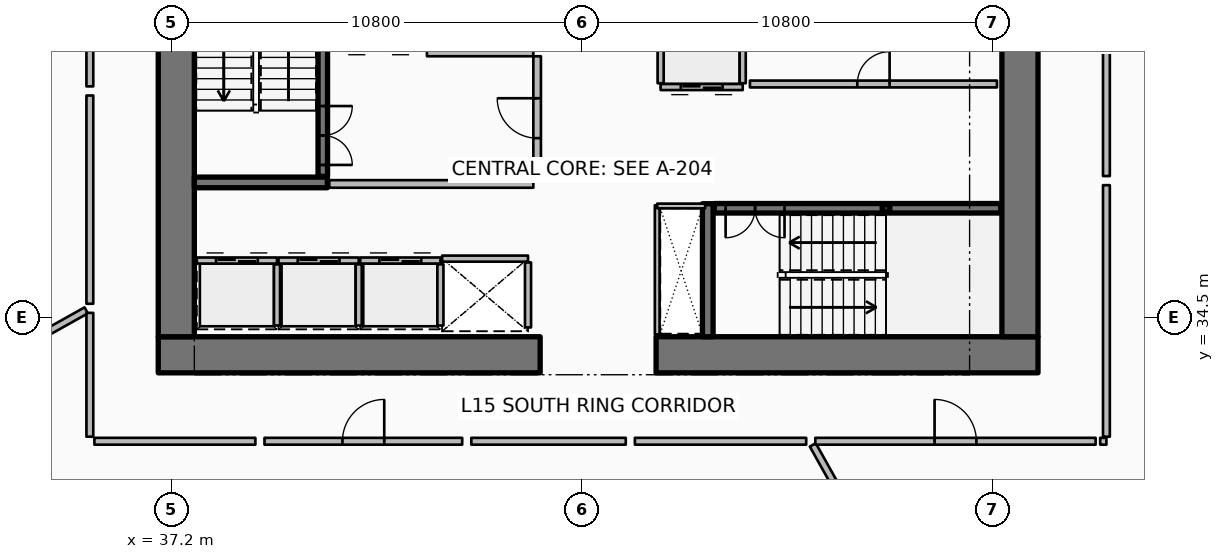
"""IFC4 building model, lengths in metres.
Left out: names, types, materials, properties, quantities, classifications, styles, units other than length and angle.
Written with IfcOpenShell. Run it as: python <this file> out.ifc"""

import sys

from ifc_helpers import new_model, si_unit, direction, frame, frame_2d, origin, origin_2d, place, context, subcontext, project, spatial, rectangle, hollow_rectangle, extrude, element, fill, save


model = new_model("IFC4")
c1 = context("Model", 3, precision=1e-05, world=origin(), true_north=direction((0.0, 1.0)))
c2 = subcontext(c1, "Body", "Model", "MODEL_VIEW")
j1 = project(units=[si_unit("LENGTHUNIT", "METRE"), si_unit("PLANEANGLEUNIT", "RADIAN")], contexts=[c1])
p1 = place(None, origin())
s1 = spatial("IfcSite", under=j1, at=p1, CompositionType="ELEMENT")
p2 = place(p1, origin())
s2 = spatial("IfcBuilding", under=s1, at=p2, CompositionType="ELEMENT")
p3 = place(p2, frame((0.0, 0.0, 63.9)))
s3 = spatial("IfcBuildingStorey", under=s2, at=p3, CompositionType="ELEMENT", Elevation=63.9)
p4 = place(p3, frame((36.85, 33.525, 0.0), z_axis=(0.0, 0.0, 1.0), x_axis=(1.0, 0.0, 0.0)))
e1 = element("IfcWall", 1, at=p4, inside=s3, PredefinedType="SHEAR", context=c2, shape_type="SweptSolid", body=[
    extrude(rectangle(XDim=10.05, YDim=0.95, at=frame_2d((5.025, 0.0))), origin(), (0.0, 0.0, 1.0), 3.75),
])
p5 = place(p3, frame((49.95, 33.525, 0.0), z_axis=(0.0, 0.0, 1.0), x_axis=(1.0, 0.0, 0.0)))
e2 = element("IfcWall", 2, at=p5, inside=s3, PredefinedType="SHEAR", context=c2, shape_type="SweptSolid", body=[
    extrude(rectangle(XDim=10.05, YDim=0.95, at=frame_2d((5.025, 0.0))), origin(), (0.0, 0.0, 1.0), 3.75),
])
for number, where, z_axis, x_axis in (
    (3, (37.325, 34.0, 0.0), (0.0, 0.0, 1.0), (0.0, 1.0, 0.0)),
    (4, (59.525, 34.0, 0.0), (0.0, 0.0, 1.0), (0.0, 1.0, 0.0)),
):
    element("IfcWall", number, at=place(p3, frame(where, z_axis=z_axis, x_axis=x_axis)), inside=s3, PredefinedType="SHEAR", context=c2, shape_type="SweptSolid", body=[
        extrude(rectangle(XDim=16.0, YDim=0.95, at=frame_2d((8.0, 0.0))), origin(), (0.0, 0.0, 1.0), 3.75),
    ])
for number, where, z_axis, x_axis in (
    (5, (37.8, 38.06, 0.0), (0.0, 0.0, 1.0), (1.0, 0.0, 0.0)),
    (6, (51.31, 34.0, 0.0), (0.0, 0.0, 1.0), (0.0, 1.0, 0.0)),
):
    element("IfcWall", number, at=place(p3, frame(where, z_axis=z_axis, x_axis=x_axis)), inside=s3, PredefinedType="SHEAR", context=c2, shape_type="SweptSolid", body=[
        extrude(rectangle(XDim=3.5, YDim=0.28, at=frame_2d((1.75, 0.0))), origin(), (0.0, 0.0, 1.0), 3.75),
    ])
p6 = place(p3, frame((56.0, 37.38, 0.0), z_axis=(0.0, 0.0, 1.0), x_axis=(1.0, 0.0, 0.0)))
e7 = element("IfcColumn", 7, at=p6, inside=s3, PredefinedType="COLUMN", context=c2, shape_type="SweptSolid", body=[
    extrude(hollow_rectangle(XDim=0.2, YDim=0.2, WallThickness=0.01, InnerFilletRadius=0.01, OuterFilletRadius=0.02, at=origin_2d()), origin(), (0.0, 0.0, 1.0), 1.67),
])
p7 = place(p3, frame((41.18, 38.22, 0.0), z_axis=(0.0, 0.0, 1.0), x_axis=(0.0, 1.0, 0.0)))
e8 = element("IfcWall", 8, at=p7, inside=s3, PredefinedType="SOLIDWALL", context=c2, shape_type="SweptSolid", body=[
    extrude(rectangle(XDim=7.56, YDim=0.25, at=frame_2d((3.78, 0.0))), origin(), (0.0, 0.0, 1.0), 3.5),
])
p8 = place(p7, frame((0.3, 0.0, 0.0)))
e9 = element("IfcOpeningElement", 9, at=p8, cuts=e8, PredefinedType="OPENING", context=c2, shape_type="SweptSolid", body=[
    extrude(rectangle(XDim=1.55, YDim=2.15, at=frame_2d((0.775, 1.075))), frame((0.0, 0.135, 0.0), z_axis=(0.0, -1.0, 0.0), x_axis=(1.0, 0.0, 0.0)), (0.0, 0.0, 1.0), 0.27),
])
p9 = place(p3, frame((51.48, 37.38, 0.0), z_axis=(0.0, 0.0, 1.0), x_axis=(1.0, 0.0, 0.0)))
e10 = element("IfcWall", 10, at=p9, inside=s3, PredefinedType="SOLIDWALL", context=c2, shape_type="SweptSolid", body=[
    extrude(rectangle(XDim=7.54, YDim=0.25, at=frame_2d((3.77, 0.0))), origin(), (0.0, 0.0, 1.0), 3.5),
])
p10 = place(p9, frame((0.3, 0.0, 0.0)))
e11 = element("IfcOpeningElement", 11, at=p10, cuts=e10, PredefinedType="OPENING", context=c2, shape_type="SweptSolid", body=[
    extrude(rectangle(XDim=1.55, YDim=2.15, at=frame_2d((0.775, 1.075))), frame((0.0, 0.135, 0.0), z_axis=(0.0, -1.0, 0.0), x_axis=(1.0, 0.0, 0.0)), (0.0, 0.0, 1.0), 0.27),
])
p11 = place(p3, frame((37.865, 36.005, 0.0), z_axis=(0.0, 0.0, 1.0), x_axis=(1.0, 0.0, 0.0)))
e12 = element("IfcWall", 12, at=p11, inside=s3, PredefinedType="PARTITIONING", context=c2, shape_type="SweptSolid", body=[
    extrude(rectangle(XDim=2.11, YDim=0.16, at=frame_2d((1.055, 0.0))), origin(), (0.0, 0.0, 1.0), 3.5),
])
p12 = place(p11, frame((0.505, 0.0, 0.0)))
e13 = element("IfcOpeningElement", 13, at=p12, cuts=e12, PredefinedType="OPENING", context=c2, shape_type="SweptSolid", body=[
    extrude(rectangle(XDim=1.1, YDim=2.1, at=frame_2d((0.55, 1.05))), frame((0.0, 0.09, 0.0), z_axis=(0.0, -1.0, 0.0), x_axis=(1.0, 0.0, 0.0)), (0.0, 0.0, 1.0), 0.18),
])
p13 = place(p3, frame((39.975, 34.295, 0.0), z_axis=(0.0, 0.0, 1.0), x_axis=(0.0, 1.0, 0.0)))
e14 = element("IfcWall", 14, at=p13, inside=s3, PredefinedType="PARTITIONING", context=c2, shape_type="SweptSolid", body=[
    extrude(rectangle(XDim=1.61, YDim=0.16, at=frame_2d((0.805, 0.0))), origin(), (0.0, 0.0, 1.0), 3.5),
])
p14 = place(p3, frame((40.015, 36.005, 0.0), z_axis=(0.0, 0.0, 1.0), x_axis=(1.0, 0.0, 0.0)))
e15 = element("IfcWall", 15, at=p14, inside=s3, PredefinedType="PARTITIONING", context=c2, shape_type="SweptSolid", body=[
    extrude(rectangle(XDim=2.11, YDim=0.16, at=frame_2d((1.055, 0.0))), origin(), (0.0, 0.0, 1.0), 3.5),
])
p15 = place(p14, frame((0.505, 0.0, 0.0)))
e16 = element("IfcOpeningElement", 16, at=p15, cuts=e15, PredefinedType="OPENING", context=c2, shape_type="SweptSolid", body=[
    extrude(rectangle(XDim=1.1, YDim=2.1, at=frame_2d((0.55, 1.05))), frame((0.0, 0.09, 0.0), z_axis=(0.0, -1.0, 0.0), x_axis=(1.0, 0.0, 0.0)), (0.0, 0.0, 1.0), 0.18),
])
p16 = place(p3, frame((42.125, 34.295, 0.0), z_axis=(0.0, 0.0, 1.0), x_axis=(0.0, 1.0, 0.0)))
e17 = element("IfcWall", 17, at=p16, inside=s3, PredefinedType="PARTITIONING", context=c2, shape_type="SweptSolid", body=[
    extrude(rectangle(XDim=1.61, YDim=0.16, at=frame_2d((0.805, 0.0))), origin(), (0.0, 0.0, 1.0), 3.5),
])
p17 = place(p3, frame((42.165, 36.005, 0.0), z_axis=(0.0, 0.0, 1.0), x_axis=(1.0, 0.0, 0.0)))
e18 = element("IfcWall", 18, at=p17, inside=s3, PredefinedType="PARTITIONING", context=c2, shape_type="SweptSolid", body=[
    extrude(rectangle(XDim=2.11, YDim=0.16, at=frame_2d((1.055, 0.0))), origin(), (0.0, 0.0, 1.0), 3.5),
])
p18 = place(p17, frame((0.505, 0.0, 0.0)))
e19 = element("IfcOpeningElement", 19, at=p18, cuts=e18, PredefinedType="OPENING", context=c2, shape_type="SweptSolid", body=[
    extrude(rectangle(XDim=1.1, YDim=2.1, at=frame_2d((0.55, 1.05))), frame((0.0, 0.09, 0.0), z_axis=(0.0, -1.0, 0.0), x_axis=(1.0, 0.0, 0.0)), (0.0, 0.0, 1.0), 0.18),
])
p19 = place(p3, frame((44.275, 34.295, 0.0), z_axis=(0.0, 0.0, 1.0), x_axis=(0.0, 1.0, 0.0)))
e20 = element("IfcWall", 20, at=p19, inside=s3, PredefinedType="PARTITIONING", context=c2, shape_type="SweptSolid", body=[
    extrude(rectangle(XDim=1.61, YDim=0.16, at=frame_2d((0.805, 0.0))), origin(), (0.0, 0.0, 1.0), 3.5),
])
p20 = place(p3, frame((44.32, 36.055, 0.0), z_axis=(0.0, 0.0, 1.0), x_axis=(1.0, 0.0, 0.0)))
e21 = element("IfcWall", 21, at=p20, inside=s3, PredefinedType="PARTITIONING", context=c2, shape_type="SweptSolid", body=[
    extrude(rectangle(XDim=2.26, YDim=0.16, at=frame_2d((1.13, 0.0))), origin(), (0.0, 0.0, 1.0), 3.5),
])
p21 = place(p3, frame((46.58, 34.245, 0.0), z_axis=(0.0, 0.0, 1.0), x_axis=(0.0, 1.0, 0.0)))
e22 = element("IfcWall", 22, at=p21, inside=s3, PredefinedType="PARTITIONING", context=c2, shape_type="SweptSolid", body=[
    extrude(rectangle(XDim=1.71, YDim=0.16, at=frame_2d((0.855, 0.0))), origin(), (0.0, 0.0, 1.0), 3.5),
])
p22 = place(p3, frame((52.23, 40.57, 0.0), z_axis=(0.0, 0.0, 1.0), x_axis=(-1.0, 0.0, 0.0)))
e23 = element("IfcWall", 23, at=p22, inside=s3, PredefinedType="PARTITIONING", context=c2, shape_type="SweptSolid", body=[
    extrude(rectangle(XDim=2.16, YDim=0.16, at=frame_2d((1.08, 0.0))), origin(), (0.0, 0.0, 1.0), 3.5),
])
p23 = place(p22, frame((0.53, 0.0, 0.0)))
e24 = element("IfcOpeningElement", 24, at=p23, cuts=e23, PredefinedType="OPENING", context=c2, shape_type="SweptSolid", body=[
    extrude(rectangle(XDim=1.1, YDim=2.1, at=frame_2d((0.55, 1.05))), frame((0.0, 0.09, 0.0), z_axis=(0.0, -1.0, 0.0), x_axis=(1.0, 0.0, 0.0)), (0.0, 0.0, 1.0), 0.18),
])
for number, where, z_axis, x_axis in (
    (25, (52.23, 40.67, 0.0), (0.0, 0.0, 1.0), (0.0, 1.0, 0.0)),
    (26, (50.07, 40.67, 0.0), (0.0, 0.0, 1.0), (0.0, 1.0, 0.0)),
):
    element("IfcWall", number, at=place(p3, frame(where, z_axis=z_axis, x_axis=x_axis)), inside=s3, PredefinedType="PARTITIONING", context=c2, shape_type="SweptSolid", body=[
        extrude(rectangle(XDim=2.16, YDim=0.16, at=frame_2d((1.08, 0.0))), origin(), (0.0, 0.0, 1.0), 3.5),
    ])
p24 = place(p3, frame((52.42, 40.65, 0.0), z_axis=(0.0, 0.0, 1.0), x_axis=(1.0, 0.0, 0.0)))
e27 = element("IfcWall", 27, at=p24, inside=s3, PredefinedType="PARTITIONING", context=c2, shape_type="SweptSolid", body=[
    extrude(rectangle(XDim=6.5, YDim=0.18, at=frame_2d((3.25, 0.0))), origin(), (0.0, 0.0, 1.0), 3.5),
])
p25 = place(p24, frame((2.825, 0.0, 0.0)))
e28 = element("IfcOpeningElement", 28, at=p25, cuts=e27, PredefinedType="OPENING", context=c2, shape_type="SweptSolid", body=[
    extrude(rectangle(XDim=0.85, YDim=2.06, at=frame_2d((0.425, 1.03))), frame((0.0, 0.1, 0.0), z_axis=(0.0, -1.0, 0.0), x_axis=(1.0, 0.0, 0.0)), (0.0, 0.0, 1.0), 0.2),
])
p26 = place(p3, frame((41.35, 38.02, 0.0), z_axis=(0.0, 0.0, 1.0), x_axis=(1.0, 0.0, 0.0)))
e29 = element("IfcWall", 29, at=p26, inside=s3, PredefinedType="PARTITIONING", context=c2, shape_type="SweptSolid", body=[
    extrude(rectangle(XDim=5.37, YDim=0.2, at=frame_2d((2.685, 0.0))), origin(), (0.0, 0.0, 1.0), 3.5),
])
p27 = place(p3, frame((43.92, 41.48, 0.0), z_axis=(0.0, 0.0, 1.0), x_axis=(1.0, 0.0, 0.0)))
e30 = element("IfcWall", 30, at=p27, inside=s3, PredefinedType="PARTITIONING", context=c2, shape_type="SweptSolid", body=[
    extrude(rectangle(XDim=2.8, YDim=0.2, at=frame_2d((1.4, 0.0))), origin(), (0.0, 0.0, 1.0), 3.5),
])
p28 = place(p3, frame((46.82, 38.12, 0.0), z_axis=(0.0, 0.0, 1.0), x_axis=(0.0, 1.0, 0.0)))
e31 = element("IfcWall", 31, at=p28, inside=s3, PredefinedType="PARTITIONING", context=c2, shape_type="SweptSolid", body=[
    extrude(rectangle(XDim=3.26, YDim=0.2, at=frame_2d((1.63, 0.0))), origin(), (0.0, 0.0, 1.0), 3.5),
])
p29 = place(p28, frame((1.105, 0.0, 0.0)))
e32 = element("IfcOpeningElement", 32, at=p29, cuts=e31, PredefinedType="OPENING", context=c2, shape_type="SweptSolid", body=[
    extrude(rectangle(XDim=1.05, YDim=2.1, at=frame_2d((0.525, 1.05))), frame((0.0, 0.11, 0.0), z_axis=(0.0, -1.0, 0.0), x_axis=(1.0, 0.0, 0.0)), (0.0, 0.0, 1.0), 0.22),
])
p30 = place(p3, frame((49.98, 34.06, 0.0), z_axis=(0.0, 0.0, 1.0), x_axis=(0.0, 1.0, 0.0)))
e33 = element("IfcWall", 33, at=p30, inside=s3, PredefinedType="PARTITIONING", context=c2, shape_type="SweptSolid", body=[
    extrude(rectangle(XDim=3.4, YDim=0.125, at=frame_2d((1.7, 0.0))), origin(), (0.0, 0.0, 1.0), 2.94),
])
p31 = place(p3, frame((49.98, 37.44, 0.0), z_axis=(0.0, 0.0, 1.0), x_axis=(1.0, 0.0, 0.0)))
e34 = element("IfcWall", 34, at=p31, inside=s3, PredefinedType="PARTITIONING", context=c2, shape_type="SweptSolid", body=[
    extrude(rectangle(XDim=1.26, YDim=0.125, at=frame_2d((0.63, 0.0))), origin(), (0.0, 0.0, 1.0), 2.94),
])
p32 = place(p3, frame((34.954, 34.694, 0.0), z_axis=(0.0, 0.0, 1.0), x_axis=(-0.872493465611, -0.488625779577, 0.0)))
e35 = element("IfcWall", 35, at=p32, inside=s3, PredefinedType="PARTITIONING", context=c2, shape_type="SweptSolid", body=[
    extrude(rectangle(XDim=16.586, YDim=0.18, at=frame_2d((8.293, 0.0))), origin(), (0.0, 0.0, 1.0), 2.867),
])
p33 = place(p3, frame((54.074, 31.154, 0.0), z_axis=(0.0, 0.0, 1.0), x_axis=(0.48862612996, -0.872493269384, 0.0)))
e36 = element("IfcWall", 36, at=p33, inside=s3, PredefinedType="PARTITIONING", context=c2, shape_type="SweptSolid", body=[
    extrude(rectangle(XDim=13.065, YDim=0.18, at=frame_2d((6.532, 0.0))), origin(), (0.0, 0.0, 1.0), 2.867),
])
p34 = place(p3, frame((35.05, 45.532, 0.0), z_axis=(0.0, 0.0, 1.0), x_axis=(0.0, -1.0, 0.0)))
e37 = element("IfcWall", 37, at=p34, inside=s3, PredefinedType="PARTITIONING", context=c2, shape_type="SweptSolid", body=[
    extrude(rectangle(XDim=4.945, YDim=0.18, at=frame_2d((2.472, 0.0))), origin(), (0.0, 0.0, 1.0), 2.867),
])
p35 = place(p3, frame((35.05, 40.347, 0.0), z_axis=(0.0, 0.0, 1.0), x_axis=(0.0, -1.0, 0.0)))
e38 = element("IfcWall", 38, at=p35, inside=s3, PredefinedType="PARTITIONING", context=c2, shape_type="SweptSolid", body=[
    extrude(rectangle(XDim=5.48, YDim=0.18, at=frame_2d((2.74, 0.0))), origin(), (0.0, 0.0, 1.0), 2.867),
])
p36 = place(p3, frame((39.646, 31.25, 0.0), z_axis=(0.0, 0.0, 1.0), x_axis=(1.0, 0.0, 0.0)))
e39 = element("IfcWall", 39, at=p36, inside=s3, PredefinedType="PARTITIONING", context=c2, shape_type="SweptSolid", body=[
    extrude(rectangle(XDim=5.203, YDim=0.18, at=frame_2d((2.601, 0.0))), origin(), (0.0, 0.0, 1.0), 2.867),
])
p37 = place(p36, frame((2.052, 0.0, 0.0)))
e40 = element("IfcOpeningElement", 40, at=p37, cuts=e39, PredefinedType="OPENING", context=c2, shape_type="SweptSolid", body=[
    extrude(rectangle(XDim=1.1, YDim=2.1, at=frame_2d((0.55, 1.05))), frame((0.0, 0.1, 0.0), z_axis=(0.0, -1.0, 0.0), x_axis=(1.0, 0.0, 0.0)), (0.0, 0.0, 1.0), 0.2),
])
p38 = place(p3, frame((35.05, 34.628, 0.0), z_axis=(0.0, 0.0, 1.0), x_axis=(0.0, -1.0, 0.0)))
e41 = element("IfcWall", 41, at=p38, inside=s3, PredefinedType="PARTITIONING", context=c2, shape_type="SweptSolid", body=[
    extrude(rectangle(XDim=3.258, YDim=0.18, at=frame_2d((1.629, 0.0))), origin(), (0.0, 0.0, 1.0), 2.867),
])
p39 = place(p3, frame((35.17, 31.25, 0.0), z_axis=(0.0, 0.0, 1.0), x_axis=(1.0, 0.0, 0.0)))
e42 = element("IfcWall", 42, at=p39, inside=s3, PredefinedType="PARTITIONING", context=c2, shape_type="SweptSolid", body=[
    extrude(rectangle(XDim=4.236, YDim=0.18, at=frame_2d((2.118, 0.0))), origin(), (0.0, 0.0, 1.0), 2.867),
])
p40 = place(p3, frame((33.075, 30.413, 0.0), z_axis=(0.0, 0.0, 1.0), x_axis=(0.655021066846, -0.755610615322, 0.0)))
e43 = element("IfcWall", 43, at=p40, inside=s3, PredefinedType="PARTITIONING", context=c2, shape_type="SweptSolid", body=[
    extrude(rectangle(XDim=2.053, YDim=0.125, at=frame_2d((1.027, 0.0))), origin(), (0.0, 0.0, 1.0), 2.94),
])
p41 = place(p40, frame((0.602, 0.0, 0.0)))
e44 = element("IfcOpeningElement", 44, at=p41, cuts=e43, PredefinedType="OPENING", context=c2, shape_type="SweptSolid", body=[
    extrude(rectangle(XDim=0.85, YDim=2.06, at=frame_2d((0.425, 1.03))), frame((0.0, 0.073, 0.0), z_axis=(0.0, -1.0, 0.0), x_axis=(1.0, 0.0, 0.0)), (0.0, 0.0, 1.0), 0.145),
])
p42 = place(p3, frame((45.088, 31.25, 0.0), z_axis=(0.0, 0.0, 1.0), x_axis=(1.0, 0.0, 0.0)))
e45 = element("IfcWall", 45, at=p42, inside=s3, PredefinedType="PARTITIONING", context=c2, shape_type="SweptSolid", body=[
    extrude(rectangle(XDim=4.064, YDim=0.18, at=frame_2d((2.032, 0.0))), origin(), (0.0, 0.0, 1.0), 2.867),
])
p43 = place(p3, frame((49.392, 31.25, 0.0), z_axis=(0.0, 0.0, 1.0), x_axis=(1.0, 0.0, 0.0)))
e46 = element("IfcWall", 46, at=p43, inside=s3, PredefinedType="PARTITIONING", context=c2, shape_type="SweptSolid", body=[
    extrude(rectangle(XDim=4.508, YDim=0.18, at=frame_2d((2.254, 0.0))), origin(), (0.0, 0.0, 1.0), 2.867),
])
p44 = place(p3, frame((54.14, 31.25, 0.0), z_axis=(0.0, 0.0, 1.0), x_axis=(1.0, 0.0, 0.0)))
e47 = element("IfcWall", 47, at=p44, inside=s3, PredefinedType="PARTITIONING", context=c2, shape_type="SweptSolid", body=[
    extrude(rectangle(XDim=7.376, YDim=0.18, at=frame_2d((3.688, 0.0))), origin(), (0.0, 0.0, 1.0), 2.867),
])
p45 = place(p44, frame((3.138, 0.0, 0.0)))
e48 = element("IfcOpeningElement", 48, at=p45, cuts=e47, PredefinedType="OPENING", context=c2, shape_type="SweptSolid", body=[
    extrude(rectangle(XDim=1.1, YDim=2.1, at=frame_2d((0.55, 1.05))), frame((0.0, 0.1, 0.0), z_axis=(0.0, -1.0, 0.0), x_axis=(1.0, 0.0, 0.0)), (0.0, 0.0, 1.0), 0.2),
])
p46 = place(p3, frame((61.636, 31.25, 0.0), z_axis=(0.0, 0.0, 1.0), x_axis=(1.0, 0.0, 0.0)))
e49 = element("IfcWall", 49, at=p46, inside=s3, PredefinedType="PARTITIONING", context=c2, shape_type="SweptSolid", body=[
    extrude(rectangle(XDim=0.164, YDim=0.18, at=frame_2d((0.082, 0.0))), origin(), (0.0, 0.0, 1.0), 2.867),
])
p47 = place(p3, frame((61.8, 31.37, 0.0), z_axis=(0.0, 0.0, 1.0), x_axis=(0.0, 1.0, 0.0)))
e50 = element("IfcWall", 50, at=p47, inside=s3, PredefinedType="PARTITIONING", context=c2, shape_type="SweptSolid", body=[
    extrude(rectangle(XDim=6.618, YDim=0.18, at=frame_2d((3.309, 0.0))), origin(), (0.0, 0.0, 1.0), 2.867),
])
p48 = place(p3, frame((61.8, 38.228, 0.0), z_axis=(0.0, 0.0, 1.0), x_axis=(0.0, 1.0, 0.0)))
e51 = element("IfcWall", 51, at=p48, inside=s3, PredefinedType="PARTITIONING", context=c2, shape_type="SweptSolid", body=[
    extrude(rectangle(XDim=5.285, YDim=0.18, at=frame_2d((2.643, 0.0))), origin(), (0.0, 0.0, 1.0), 2.867),
])
p49 = place(p8, origin())
e52 = element("IfcDoor", 52, at=p49, inside=s3, OperationType="DOUBLE_DOOR_SINGLE_SWING", PredefinedType="DOOR", context=c2, shape_type="SweptSolid", body=[
    extrude(rectangle(XDim=1.55, YDim=2.15, at=frame_2d((0.775, 1.075))), frame((0.0, 0.025, 0.0), z_axis=(0.0, -1.0, 0.0), x_axis=(1.0, 0.0, 0.0)), (0.0, 0.0, 1.0), 0.05),
])
fill(e9, e52)
p50 = place(p10, origin())
e53 = element("IfcDoor", 53, at=p50, inside=s3, OperationType="DOUBLE_DOOR_SINGLE_SWING", PredefinedType="DOOR", context=c2, shape_type="SweptSolid", body=[
    extrude(rectangle(XDim=1.55, YDim=2.15, at=frame_2d((0.775, 1.075))), frame((0.0, 0.025, 0.0), z_axis=(0.0, -1.0, 0.0), x_axis=(1.0, 0.0, 0.0)), (0.0, 0.0, 1.0), 0.05),
])
fill(e11, e53)
p51 = place(p12, origin())
e54 = element("IfcDoor", 54, at=p51, inside=s3, OperationType="DOUBLE_DOOR_SLIDING", PredefinedType="DOOR", context=c2, shape_type="SweptSolid", body=[
    extrude(rectangle(XDim=1.1, YDim=2.1, at=frame_2d((0.55, 1.05))), frame((0.0, 0.025, 0.0), z_axis=(0.0, -1.0, 0.0), x_axis=(1.0, 0.0, 0.0)), (0.0, 0.0, 1.0), 0.05),
])
fill(e13, e54)
p52 = place(p15, origin())
e55 = element("IfcDoor", 55, at=p52, inside=s3, OperationType="DOUBLE_DOOR_SLIDING", PredefinedType="DOOR", context=c2, shape_type="SweptSolid", body=[
    extrude(rectangle(XDim=1.1, YDim=2.1, at=frame_2d((0.55, 1.05))), frame((0.0, 0.025, 0.0), z_axis=(0.0, -1.0, 0.0), x_axis=(1.0, 0.0, 0.0)), (0.0, 0.0, 1.0), 0.05),
])
fill(e16, e55)
p53 = place(p18, origin())
e56 = element("IfcDoor", 56, at=p53, inside=s3, OperationType="DOUBLE_DOOR_SLIDING", PredefinedType="DOOR", context=c2, shape_type="SweptSolid", body=[
    extrude(rectangle(XDim=1.1, YDim=2.1, at=frame_2d((0.55, 1.05))), frame((0.0, 0.025, 0.0), z_axis=(0.0, -1.0, 0.0), x_axis=(1.0, 0.0, 0.0)), (0.0, 0.0, 1.0), 0.05),
])
fill(e19, e56)
p54 = place(p23, origin())
e57 = element("IfcDoor", 57, at=p54, inside=s3, OperationType="DOUBLE_DOOR_SLIDING", PredefinedType="DOOR", context=c2, shape_type="SweptSolid", body=[
    extrude(rectangle(XDim=1.1, YDim=2.1, at=frame_2d((0.55, 1.05))), frame((0.0, 0.025, 0.0), z_axis=(0.0, -1.0, 0.0), x_axis=(1.0, 0.0, 0.0)), (0.0, 0.0, 1.0), 0.05),
])
fill(e24, e57)
p55 = place(p25, origin())
e58 = element("IfcDoor", 58, at=p55, inside=s3, OperationType="SINGLE_SWING_RIGHT", PredefinedType="DOOR", context=c2, shape_type="SweptSolid", body=[
    extrude(rectangle(XDim=0.85, YDim=2.06, at=frame_2d((0.425, 1.03))), frame((0.0, 0.025, 0.0), z_axis=(0.0, -1.0, 0.0), x_axis=(1.0, 0.0, 0.0)), (0.0, 0.0, 1.0), 0.05),
])
fill(e28, e58)
p56 = place(p29, origin())
e59 = element("IfcDoor", 59, at=p56, inside=s3, OperationType="SINGLE_SWING_RIGHT", PredefinedType="DOOR", context=c2, shape_type="SweptSolid", body=[
    extrude(rectangle(XDim=1.05, YDim=2.1, at=frame_2d((0.525, 1.05))), frame((0.0, 0.025, 0.0), z_axis=(0.0, -1.0, 0.0), x_axis=(1.0, 0.0, 0.0)), (0.0, 0.0, 1.0), 0.05),
])
fill(e32, e59)
p57 = place(p37, origin())
e60 = element("IfcDoor", 60, at=p57, inside=s3, OperationType="SINGLE_SWING_RIGHT", PredefinedType="DOOR", context=c2, shape_type="SweptSolid", body=[
    extrude(rectangle(XDim=1.1, YDim=2.1, at=frame_2d((0.55, 1.05))), frame((0.0, 0.025, 0.0), z_axis=(0.0, -1.0, 0.0), x_axis=(1.0, 0.0, 0.0)), (0.0, 0.0, 1.0), 0.05),
])
fill(e40, e60)
p58 = place(p45, origin())
e61 = element("IfcDoor", 61, at=p58, inside=s3, OperationType="SINGLE_SWING_LEFT", PredefinedType="DOOR", context=c2, shape_type="SweptSolid", body=[
    extrude(rectangle(XDim=1.1, YDim=2.1, at=frame_2d((0.55, 1.05))), frame((0.0, 0.025, 0.0), z_axis=(0.0, -1.0, 0.0), x_axis=(1.0, 0.0, 0.0)), (0.0, 0.0, 1.0), 0.05),
])
fill(e48, e61)
save(model, sys.argv[1])
